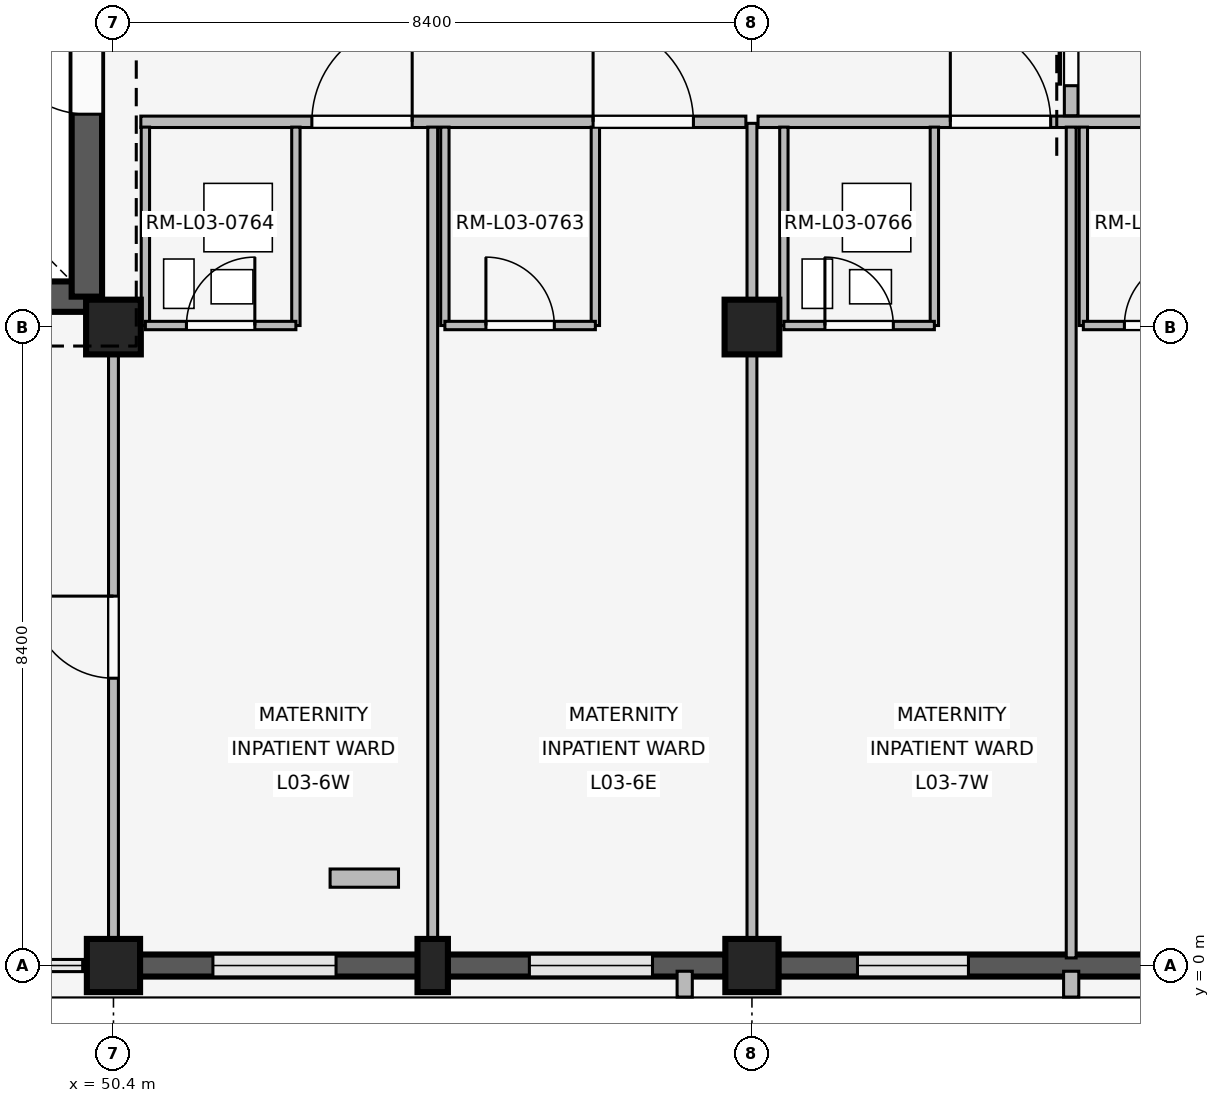
"""IFC4 building model, lengths in metres.
Left out: names, types, materials, properties, quantities, classifications, styles, units other than length and angle.
Written with IfcOpenShell. Run it as: python <this file> out.ifc"""

import sys

from ifc_helpers import new_model, si_unit, direction, frame, frame_2d, origin, origin_2d, place, context, subcontext, project, spatial, rectangle, extrude, element, fill, save


model = new_model("IFC4")
c1 = context("Model", 3, precision=1e-05, world=origin(), true_north=direction((0.0, 1.0)))
c2 = subcontext(c1, "Body", "Model", "MODEL_VIEW")
j1 = project(units=[si_unit("LENGTHUNIT", "METRE"), si_unit("PLANEANGLEUNIT", "RADIAN")], contexts=[c1])
p1 = place(None, origin())
s1 = spatial("IfcSite", under=j1, at=p1, CompositionType="ELEMENT")
p2 = place(p1, origin())
s2 = spatial("IfcBuilding", under=s1, at=p2, CompositionType="ELEMENT")
p3 = place(p2, frame((0.0, 0.0, 12.9)))
s3 = spatial("IfcBuildingStorey", under=s2, at=p3, CompositionType="ELEMENT", Elevation=12.9)
p4 = place(p3, frame((50.4, 0.0, 0.0), z_axis=(0.0, 0.0, 1.0), x_axis=(1.0, 0.0, 0.0)))
e1 = element("IfcColumn", 1, at=p4, inside=s3, PredefinedType="COLUMN", context=c2, shape_type="SweptSolid", body=[
    extrude(rectangle(XDim=0.7, YDim=0.7, at=origin_2d()), origin(), (0.0, 0.0, 1.0), 3.3),
])
p5 = place(p3, frame((50.4, 8.4, 0.0), z_axis=(0.0, 0.0, 1.0), x_axis=(1.0, 0.0, 0.0)))
e2 = element("IfcColumn", 2, at=p5, inside=s3, PredefinedType="COLUMN", context=c2, shape_type="SweptSolid", body=[
    extrude(rectangle(XDim=0.72, YDim=0.72, at=origin_2d()), origin(), (0.0, 0.0, 1.0), 3.3),
])
p6 = place(p3, frame((58.8, 0.0, 0.0), z_axis=(0.0, 0.0, 1.0), x_axis=(1.0, 0.0, 0.0)))
e3 = element("IfcColumn", 3, at=p6, inside=s3, PredefinedType="COLUMN", context=c2, shape_type="SweptSolid", body=[
    extrude(rectangle(XDim=0.7, YDim=0.7, at=origin_2d()), origin(), (0.0, 0.0, 1.0), 3.3),
])
p7 = place(p3, frame((58.8, 8.4, 0.0), z_axis=(0.0, 0.0, 1.0), x_axis=(1.0, 0.0, 0.0)))
e4 = element("IfcColumn", 4, at=p7, inside=s3, PredefinedType="COLUMN", context=c2, shape_type="SweptSolid", body=[
    extrude(rectangle(XDim=0.72, YDim=0.72, at=origin_2d()), origin(), (0.0, 0.0, 1.0), 3.3),
])
p8 = place(p3, frame((54.6, 0.0, 0.0), z_axis=(0.0, 0.0, 1.0), x_axis=(1.0, 0.0, 0.0)))
e5 = element("IfcColumn", 5, at=p8, inside=s3, PredefinedType="PILASTER", context=c2, shape_type="SweptSolid", body=[
    extrude(rectangle(XDim=0.4, YDim=0.7, at=origin_2d()), origin(), (0.0, 0.0, 1.0), 3.3),
])
p9 = place(p3, frame((58.455, 0.0, 0.0), z_axis=(0.0, 0.0, 1.0), x_axis=(-1.0, 0.0, 0.0)))
e6 = element("IfcWall", 6, at=p9, inside=s3, PredefinedType="SOLIDWALL", context=c2, shape_type="SweptSolid", body=[
    extrude(rectangle(XDim=7.71, YDim=0.29, at=frame_2d((3.855, 0.0))), origin(), (0.0, 0.0, 1.0), 2.44),
])
p10 = place(p9, frame((0.963, 0.0, 0.85)))
e7 = element("IfcOpeningElement", 7, at=p10, cuts=e6, PredefinedType="OPENING", context=c2, shape_type="SweptSolid", body=[
    extrude(rectangle(XDim=1.62, YDim=0.95, at=frame_2d((0.81, 0.475))), frame((0.0, 0.155, 0.0), z_axis=(0.0, -1.0, 0.0), x_axis=(1.0, 0.0, 0.0)), (0.0, 0.0, 1.0), 0.31),
])
p11 = place(p9, frame((5.127, 0.0, 0.85)))
e8 = element("IfcOpeningElement", 8, at=p11, cuts=e6, PredefinedType="OPENING", context=c2, shape_type="SweptSolid", body=[
    extrude(rectangle(XDim=1.62, YDim=0.95, at=frame_2d((0.81, 0.475))), frame((0.0, 0.155, 0.0), z_axis=(0.0, -1.0, 0.0), x_axis=(1.0, 0.0, 0.0)), (0.0, 0.0, 1.0), 0.31),
])
p12 = place(p3, frame((57.915, -0.075, 0.0), z_axis=(0.0, 0.0, 1.0), x_axis=(0.0, -1.0, 0.0)))
e9 = element("IfcWall", 9, at=p12, inside=s3, PredefinedType="ELEMENTEDWALL", context=c2, shape_type="SweptSolid", body=[
    extrude(rectangle(XDim=0.34, YDim=0.2, at=frame_2d((0.17, 0.0))), origin(), (0.0, 0.0, 1.0), 2.42),
])
p13 = place(p3, frame((66.855, 0.0, 0.0), z_axis=(0.0, 0.0, 1.0), x_axis=(-1.0, 0.0, 0.0)))
e10 = element("IfcWall", 10, at=p13, inside=s3, PredefinedType="SOLIDWALL", context=c2, shape_type="SweptSolid", body=[
    extrude(rectangle(XDim=7.71, YDim=0.29, at=frame_2d((3.855, 0.0))), origin(), (0.0, 0.0, 1.0), 2.44),
])
p14 = place(p13, frame((1.043, 0.0, 0.85)))
e11 = element("IfcOpeningElement", 11, at=p14, cuts=e10, PredefinedType="OPENING", context=c2, shape_type="SweptSolid", body=[
    extrude(rectangle(XDim=1.46, YDim=0.85, at=frame_2d((0.73, 0.425))), frame((0.0, 0.155, 0.0), z_axis=(0.0, -1.0, 0.0), x_axis=(1.0, 0.0, 0.0)), (0.0, 0.0, 1.0), 0.31),
])
p15 = place(p13, frame((5.207, 0.0, 0.85)))
e12 = element("IfcOpeningElement", 12, at=p15, cuts=e10, PredefinedType="OPENING", context=c2, shape_type="SweptSolid", body=[
    extrude(rectangle(XDim=1.46, YDim=0.85, at=frame_2d((0.73, 0.425))), frame((0.0, 0.155, 0.0), z_axis=(0.0, -1.0, 0.0), x_axis=(1.0, 0.0, 0.0)), (0.0, 0.0, 1.0), 0.31),
])
p16 = place(p3, frame((63.0, -0.075, 0.0), z_axis=(0.0, 0.0, 1.0), x_axis=(0.0, -1.0, 0.0)))
e13 = element("IfcWall", 13, at=p16, inside=s3, PredefinedType="ELEMENTEDWALL", context=c2, shape_type="SweptSolid", body=[
    extrude(rectangle(XDim=0.34, YDim=0.2, at=frame_2d((0.17, 0.0))), origin(), (0.0, 0.0, 1.0), 2.42),
])
p17 = place(p3, frame((42.55, 8.8, 0.0), z_axis=(0.0, 0.0, 1.0), x_axis=(1.0, 0.0, 0.0)))
e14 = element("IfcWall", 14, at=p17, inside=s3, PredefinedType="SHEAR", context=c2, shape_type="SweptSolid", body=[
    extrude(rectangle(XDim=7.5, YDim=0.4, at=frame_2d((3.75, 0.0))), origin(), (0.0, 0.0, 1.0), 3.02),
])
p18 = place(p17, frame((4.85, 0.0, 0.0)))
e15 = element("IfcOpeningElement", 15, at=p18, cuts=e14, PredefinedType="OPENING", context=c2, shape_type="SweptSolid", body=[
    extrude(rectangle(XDim=1.2, YDim=2.2, at=frame_2d((0.6, 1.1))), frame((0.0, 0.21, 0.0), z_axis=(0.0, -1.0, 0.0), x_axis=(1.0, 0.0, 0.0)), (0.0, 0.0, 1.0), 0.42),
])
p19 = place(p3, frame((50.05, 8.8, 0.0), z_axis=(0.0, 0.0, 1.0), x_axis=(0.0, 1.0, 0.0)))
e16 = element("IfcWall", 16, at=p19, inside=s3, PredefinedType="SHEAR", context=c2, shape_type="SweptSolid", body=[
    extrude(rectangle(XDim=7.55, YDim=0.4, at=frame_2d((3.775, 0.0))), origin(), (0.0, 0.0, 1.0), 3.02),
])
p20 = place(p19, frame((2.4, 0.0, 0.0)))
e17 = element("IfcOpeningElement", 17, at=p20, cuts=e16, PredefinedType="OPENING", context=c2, shape_type="SweptSolid", body=[
    extrude(rectangle(XDim=1.2, YDim=2.2, at=frame_2d((0.6, 1.1))), frame((0.0, 0.21, 0.0), z_axis=(0.0, -1.0, 0.0), x_axis=(1.0, 0.0, 0.0)), (0.0, 0.0, 1.0), 0.42),
])
p21 = place(p3, frame((50.4, 0.14, 0.0), z_axis=(0.0, 0.0, 1.0), x_axis=(0.0, 1.0, 0.0)))
e18 = element("IfcWall", 18, at=p21, inside=s3, PredefinedType="PARTITIONING", context=c2, shape_type="SweptSolid", body=[
    extrude(rectangle(XDim=8.21, YDim=0.13, at=frame_2d((4.105, 0.0))), origin(), (0.0, 0.0, 1.0), 2.42),
])
p22 = place(p21, frame((3.64, 0.0, 0.0)))
e19 = element("IfcOpeningElement", 19, at=p22, cuts=e18, PredefinedType="OPENING", context=c2, shape_type="SweptSolid", body=[
    extrude(rectangle(XDim=1.08, YDim=2.15, at=frame_2d((0.54, 1.075))), frame((0.0, 0.075, 0.0), z_axis=(0.0, -1.0, 0.0), x_axis=(1.0, 0.0, 0.0)), (0.0, 0.0, 1.0), 0.15),
])
p23 = place(p3, frame((50.76, 11.1, 0.0), z_axis=(0.0, 0.0, 1.0), x_axis=(1.0, 0.0, 0.0)))
e20 = element("IfcWall", 20, at=p23, inside=s3, PredefinedType="PARTITIONING", context=c2, shape_type="SweptSolid", body=[
    extrude(rectangle(XDim=7.96, YDim=0.15, at=frame_2d((3.98, 0.0))), origin(), (0.0, 0.0, 1.0), 2.42),
])
p24 = place(p23, frame((2.25, 0.0, 0.0)))
e21 = element("IfcOpeningElement", 21, at=p24, cuts=e20, PredefinedType="OPENING", context=c2, shape_type="SweptSolid", body=[
    extrude(rectangle(XDim=1.32, YDim=2.25, at=frame_2d((0.66, 1.125))), frame((0.0, 0.085, 0.0), z_axis=(0.0, -1.0, 0.0), x_axis=(1.0, 0.0, 0.0)), (0.0, 0.0, 1.0), 0.17),
])
p25 = place(p23, frame((5.95, 0.0, 0.0)))
e22 = element("IfcOpeningElement", 22, at=p25, cuts=e20, PredefinedType="OPENING", context=c2, shape_type="SweptSolid", body=[
    extrude(rectangle(XDim=1.32, YDim=2.25, at=frame_2d((0.66, 1.125))), frame((0.0, 0.085, 0.0), z_axis=(0.0, -1.0, 0.0), x_axis=(1.0, 0.0, 0.0)), (0.0, 0.0, 1.0), 0.17),
])
p26 = place(p3, frame((54.6, 0.1, 0.0), z_axis=(0.0, 0.0, 1.0), x_axis=(0.0, 1.0, 0.0)))
e23 = element("IfcWall", 23, at=p26, inside=s3, PredefinedType="PARTITIONING", context=c2, shape_type="SweptSolid", body=[
    extrude(rectangle(XDim=10.93, YDim=0.13, at=frame_2d((5.465, 0.0))), origin(), (0.0, 0.0, 1.0), 2.42),
])
for number, where, z_axis, x_axis in (
    (24, (50.82, 8.42, 0.0), (0.0, 0.0, 1.0), (0.0, 1.0, 0.0)),
    (25, (52.8, 8.42, 0.0), (0.0, 0.0, 1.0), (0.0, 1.0, 0.0)),
):
    element("IfcWall", number, at=place(p3, frame(where, z_axis=z_axis, x_axis=x_axis)), inside=s3, PredefinedType="PARTITIONING", context=c2, shape_type="SweptSolid", body=[
        extrude(rectangle(XDim=2.61, YDim=0.11, at=frame_2d((1.305, 0.0))), origin(), (0.0, 0.0, 1.0), 2.42),
    ])
p27 = place(p3, frame((50.82, 8.42, 0.0), z_axis=(0.0, 0.0, 1.0), x_axis=(1.0, 0.0, 0.0)))
e26 = element("IfcWall", 26, at=p27, inside=s3, PredefinedType="PARTITIONING", context=c2, shape_type="SweptSolid", body=[
    extrude(rectangle(XDim=1.98, YDim=0.11, at=frame_2d((0.99, 0.0))), origin(), (0.0, 0.0, 1.0), 2.42),
])
p28 = place(p27, frame((0.54, 0.0, 0.0)))
e27 = element("IfcOpeningElement", 27, at=p28, cuts=e26, PredefinedType="OPENING", context=c2, shape_type="SweptSolid", body=[
    extrude(rectangle(XDim=0.9, YDim=2.1, at=frame_2d((0.45, 1.05))), frame((0.0, 0.065, 0.0), z_axis=(0.0, -1.0, 0.0), x_axis=(1.0, 0.0, 0.0)), (0.0, 0.0, 1.0), 0.13),
])
for number, where, z_axis, x_axis in (
    (28, (54.76, 8.42, 0.0), (0.0, 0.0, 1.0), (0.0, 1.0, 0.0)),
    (29, (56.74, 8.42, 0.0), (0.0, 0.0, 1.0), (0.0, 1.0, 0.0)),
):
    element("IfcWall", number, at=place(p3, frame(where, z_axis=z_axis, x_axis=x_axis)), inside=s3, PredefinedType="PARTITIONING", context=c2, shape_type="SweptSolid", body=[
        extrude(rectangle(XDim=2.61, YDim=0.11, at=frame_2d((1.305, 0.0))), origin(), (0.0, 0.0, 1.0), 2.42),
    ])
p29 = place(p3, frame((54.76, 8.42, 0.0), z_axis=(0.0, 0.0, 1.0), x_axis=(1.0, 0.0, 0.0)))
e30 = element("IfcWall", 30, at=p29, inside=s3, PredefinedType="PARTITIONING", context=c2, shape_type="SweptSolid", body=[
    extrude(rectangle(XDim=1.98, YDim=0.11, at=frame_2d((0.99, 0.0))), origin(), (0.0, 0.0, 1.0), 2.42),
])
p30 = place(p29, frame((0.54, 0.0, 0.0)))
e31 = element("IfcOpeningElement", 31, at=p30, cuts=e30, PredefinedType="OPENING", context=c2, shape_type="SweptSolid", body=[
    extrude(rectangle(XDim=0.9, YDim=2.1, at=frame_2d((0.45, 1.05))), frame((0.0, 0.065, 0.0), z_axis=(0.0, -1.0, 0.0), x_axis=(1.0, 0.0, 0.0)), (0.0, 0.0, 1.0), 0.13),
])
p31 = place(p3, frame((53.25, 1.15, 0.0), z_axis=(0.0, 0.0, 1.0), x_axis=(1.0, 0.0, 0.0)))
e32 = element("IfcWall", 32, at=p31, inside=s3, PredefinedType="PLUMBINGWALL", context=c2, shape_type="SweptSolid", body=[
    extrude(rectangle(XDim=0.9, YDim=0.24, at=frame_2d((0.45, 0.0))), origin(), (0.0, 0.0, 1.0), 2.42),
])
p32 = place(p3, frame((58.8, 0.14, 0.0), z_axis=(0.0, 0.0, 1.0), x_axis=(0.0, 1.0, 0.0)))
e33 = element("IfcWall", 33, at=p32, inside=s3, PredefinedType="PARTITIONING", context=c2, shape_type="SweptSolid", body=[
    extrude(rectangle(XDim=10.94, YDim=0.13, at=frame_2d((5.47, 0.0))), origin(), (0.0, 0.0, 1.0), 2.42),
])
p33 = place(p3, frame((58.88, 11.1, 0.0), z_axis=(0.0, 0.0, 1.0), x_axis=(1.0, 0.0, 0.0)))
e34 = element("IfcWall", 34, at=p33, inside=s3, PredefinedType="PARTITIONING", context=c2, shape_type="SweptSolid", body=[
    extrude(rectangle(XDim=8.24, YDim=0.15, at=frame_2d((4.12, 0.0))), origin(), (0.0, 0.0, 1.0), 2.42),
])
p34 = place(p33, frame((2.53, 0.0, 0.0)))
e35 = element("IfcOpeningElement", 35, at=p34, cuts=e34, PredefinedType="OPENING", context=c2, shape_type="SweptSolid", body=[
    extrude(rectangle(XDim=1.32, YDim=2.25, at=frame_2d((0.66, 1.125))), frame((0.0, 0.085, 0.0), z_axis=(0.0, -1.0, 0.0), x_axis=(1.0, 0.0, 0.0)), (0.0, 0.0, 1.0), 0.17),
])
p35 = place(p33, frame((6.23, 0.0, 0.0)))
e36 = element("IfcOpeningElement", 36, at=p35, cuts=e34, PredefinedType="OPENING", context=c2, shape_type="SweptSolid", body=[
    extrude(rectangle(XDim=1.32, YDim=2.25, at=frame_2d((0.66, 1.125))), frame((0.0, 0.085, 0.0), z_axis=(0.0, -1.0, 0.0), x_axis=(1.0, 0.0, 0.0)), (0.0, 0.0, 1.0), 0.17),
])
p36 = place(p3, frame((63.0, 0.1, 0.0), z_axis=(0.0, 0.0, 1.0), x_axis=(0.0, 1.0, 0.0)))
e37 = element("IfcWall", 37, at=p36, inside=s3, PredefinedType="PARTITIONING", context=c2, shape_type="SweptSolid", body=[
    extrude(rectangle(XDim=10.93, YDim=0.13, at=frame_2d((5.465, 0.0))), origin(), (0.0, 0.0, 1.0), 2.42),
])
for number, where, z_axis, x_axis in (
    (38, (59.22, 8.42, 0.0), (0.0, 0.0, 1.0), (0.0, 1.0, 0.0)),
    (39, (61.2, 8.42, 0.0), (0.0, 0.0, 1.0), (0.0, 1.0, 0.0)),
):
    element("IfcWall", number, at=place(p3, frame(where, z_axis=z_axis, x_axis=x_axis)), inside=s3, PredefinedType="PARTITIONING", context=c2, shape_type="SweptSolid", body=[
        extrude(rectangle(XDim=2.61, YDim=0.11, at=frame_2d((1.305, 0.0))), origin(), (0.0, 0.0, 1.0), 2.42),
    ])
p37 = place(p3, frame((59.22, 8.42, 0.0), z_axis=(0.0, 0.0, 1.0), x_axis=(1.0, 0.0, 0.0)))
e40 = element("IfcWall", 40, at=p37, inside=s3, PredefinedType="PARTITIONING", context=c2, shape_type="SweptSolid", body=[
    extrude(rectangle(XDim=1.98, YDim=0.11, at=frame_2d((0.99, 0.0))), origin(), (0.0, 0.0, 1.0), 2.42),
])
p38 = place(p37, frame((0.54, 0.0, 0.0)))
e41 = element("IfcOpeningElement", 41, at=p38, cuts=e40, PredefinedType="OPENING", context=c2, shape_type="SweptSolid", body=[
    extrude(rectangle(XDim=0.9, YDim=2.1, at=frame_2d((0.45, 1.05))), frame((0.0, 0.065, 0.0), z_axis=(0.0, -1.0, 0.0), x_axis=(1.0, 0.0, 0.0)), (0.0, 0.0, 1.0), 0.13),
])
p39 = place(p3, frame((63.16, 8.42, 0.0), z_axis=(0.0, 0.0, 1.0), x_axis=(0.0, 1.0, 0.0)))
e42 = element("IfcWall", 42, at=p39, inside=s3, PredefinedType="PARTITIONING", context=c2, shape_type="SweptSolid", body=[
    extrude(rectangle(XDim=2.61, YDim=0.11, at=frame_2d((1.305, 0.0))), origin(), (0.0, 0.0, 1.0), 2.42),
])
p40 = place(p3, frame((63.16, 8.42, 0.0), z_axis=(0.0, 0.0, 1.0), x_axis=(1.0, 0.0, 0.0)))
e43 = element("IfcWall", 43, at=p40, inside=s3, PredefinedType="PARTITIONING", context=c2, shape_type="SweptSolid", body=[
    extrude(rectangle(XDim=1.98, YDim=0.11, at=frame_2d((0.99, 0.0))), origin(), (0.0, 0.0, 1.0), 2.42),
])
p41 = place(p40, frame((0.54, 0.0, 0.0)))
e44 = element("IfcOpeningElement", 44, at=p41, cuts=e43, PredefinedType="OPENING", context=c2, shape_type="SweptSolid", body=[
    extrude(rectangle(XDim=0.9, YDim=2.1, at=frame_2d((0.45, 1.05))), frame((0.0, 0.065, 0.0), z_axis=(0.0, -1.0, 0.0), x_axis=(1.0, 0.0, 0.0)), (0.0, 0.0, 1.0), 0.13),
])
p42 = place(p3, frame((63.0, 11.18, 0.0), z_axis=(0.0, 0.0, 1.0), x_axis=(0.0, 1.0, 0.0)))
e45 = element("IfcWall", 45, at=p42, inside=s3, PredefinedType="PARTITIONING", context=c2, shape_type="SweptSolid", body=[
    extrude(rectangle(XDim=2.84, YDim=0.18, at=frame_2d((1.42, 0.0))), origin(), (0.0, 0.0, 1.0), 2.42),
])
p43 = place(p42, frame((0.395, 0.0, 0.0)))
e46 = element("IfcOpeningElement", 46, at=p43, cuts=e45, PredefinedType="OPENING", context=c2, shape_type="SweptSolid", body=[
    extrude(rectangle(XDim=2.05, YDim=2.35, at=frame_2d((1.025, 1.175))), frame((0.0, 0.1, 0.0), z_axis=(0.0, -1.0, 0.0), x_axis=(1.0, 0.0, 0.0)), (0.0, 0.0, 1.0), 0.2),
])
p44 = place(p10, origin())
e47 = element("IfcWindow", 47, at=p44, inside=s3, PartitioningType="SINGLE_PANEL", PredefinedType="WINDOW", context=c2, shape_type="SweptSolid", body=[
    extrude(rectangle(XDim=1.62, YDim=0.95, at=frame_2d((0.81, 0.475))), frame((0.0, 0.03, 0.0), z_axis=(0.0, -1.0, 0.0), x_axis=(1.0, 0.0, 0.0)), (0.0, 0.0, 1.0), 0.06),
])
fill(e7, e47)
p45 = place(p11, origin())
e48 = element("IfcWindow", 48, at=p45, inside=s3, PartitioningType="SINGLE_PANEL", PredefinedType="WINDOW", context=c2, shape_type="SweptSolid", body=[
    extrude(rectangle(XDim=1.62, YDim=0.95, at=frame_2d((0.81, 0.475))), frame((0.0, 0.03, 0.0), z_axis=(0.0, -1.0, 0.0), x_axis=(1.0, 0.0, 0.0)), (0.0, 0.0, 1.0), 0.06),
])
fill(e8, e48)
p46 = place(p15, origin())
e49 = element("IfcWindow", 49, at=p46, inside=s3, PartitioningType="SINGLE_PANEL", PredefinedType="WINDOW", context=c2, shape_type="SweptSolid", body=[
    extrude(rectangle(XDim=1.46, YDim=0.85, at=frame_2d((0.73, 0.425))), frame((0.0, 0.03, 0.0), z_axis=(0.0, -1.0, 0.0), x_axis=(1.0, 0.0, 0.0)), (0.0, 0.0, 1.0), 0.06),
])
fill(e12, e49)
p47 = place(p20, origin())
e50 = element("IfcDoor", 50, at=p47, inside=s3, OperationType="SINGLE_SWING_RIGHT", PredefinedType="DOOR", context=c2, shape_type="SweptSolid", body=[
    extrude(rectangle(XDim=1.2, YDim=2.2, at=frame_2d((0.6, 1.1))), frame((0.0, 0.025, 0.0), z_axis=(0.0, -1.0, 0.0), x_axis=(1.0, 0.0, 0.0)), (0.0, 0.0, 1.0), 0.05),
])
fill(e17, e50)
p48 = place(p22, origin())
e51 = element("IfcDoor", 51, at=p48, inside=s3, OperationType="SINGLE_SWING_RIGHT", PredefinedType="DOOR", context=c2, shape_type="SweptSolid", body=[
    extrude(rectangle(XDim=1.08, YDim=2.15, at=frame_2d((0.54, 1.075))), frame((0.0, 0.025, 0.0), z_axis=(0.0, -1.0, 0.0), x_axis=(1.0, 0.0, 0.0)), (0.0, 0.0, 1.0), 0.05),
])
fill(e19, e51)
p49 = place(p24, origin())
e52 = element("IfcDoor", 52, at=p49, inside=s3, OperationType="SINGLE_SWING_RIGHT", PredefinedType="DOOR", context=c2, shape_type="SweptSolid", body=[
    extrude(rectangle(XDim=1.32, YDim=2.25, at=frame_2d((0.66, 1.125))), frame((0.0, 0.025, 0.0), z_axis=(0.0, -1.0, 0.0), x_axis=(1.0, 0.0, 0.0)), (0.0, 0.0, 1.0), 0.05),
])
fill(e21, e52)
p50 = place(p25, origin())
e53 = element("IfcDoor", 53, at=p50, inside=s3, OperationType="SINGLE_SWING_LEFT", PredefinedType="DOOR", context=c2, shape_type="SweptSolid", body=[
    extrude(rectangle(XDim=1.32, YDim=2.25, at=frame_2d((0.66, 1.125))), frame((0.0, 0.025, 0.0), z_axis=(0.0, -1.0, 0.0), x_axis=(1.0, 0.0, 0.0)), (0.0, 0.0, 1.0), 0.05),
])
fill(e22, e53)
p51 = place(p28, origin())
e54 = element("IfcDoor", 54, at=p51, inside=s3, OperationType="SINGLE_SWING_RIGHT", PredefinedType="DOOR", context=c2, shape_type="SweptSolid", body=[
    extrude(rectangle(XDim=0.9, YDim=2.1, at=frame_2d((0.45, 1.05))), frame((0.0, 0.025, 0.0), z_axis=(0.0, -1.0, 0.0), x_axis=(1.0, 0.0, 0.0)), (0.0, 0.0, 1.0), 0.05),
])
fill(e27, e54)
p52 = place(p30, origin())
e55 = element("IfcDoor", 55, at=p52, inside=s3, OperationType="SINGLE_SWING_LEFT", PredefinedType="DOOR", context=c2, shape_type="SweptSolid", body=[
    extrude(rectangle(XDim=0.9, YDim=2.1, at=frame_2d((0.45, 1.05))), frame((0.0, 0.025, 0.0), z_axis=(0.0, -1.0, 0.0), x_axis=(1.0, 0.0, 0.0)), (0.0, 0.0, 1.0), 0.05),
])
fill(e31, e55)
p53 = place(p34, origin())
e56 = element("IfcDoor", 56, at=p53, inside=s3, OperationType="SINGLE_SWING_LEFT", PredefinedType="DOOR", context=c2, shape_type="SweptSolid", body=[
    extrude(rectangle(XDim=1.32, YDim=2.25, at=frame_2d((0.66, 1.125))), frame((0.0, 0.025, 0.0), z_axis=(0.0, -1.0, 0.0), x_axis=(1.0, 0.0, 0.0)), (0.0, 0.0, 1.0), 0.05),
])
fill(e35, e56)
p54 = place(p38, origin())
e57 = element("IfcDoor", 57, at=p54, inside=s3, OperationType="SINGLE_SWING_LEFT", PredefinedType="DOOR", context=c2, shape_type="SweptSolid", body=[
    extrude(rectangle(XDim=0.9, YDim=2.1, at=frame_2d((0.45, 1.05))), frame((0.0, 0.025, 0.0), z_axis=(0.0, -1.0, 0.0), x_axis=(1.0, 0.0, 0.0)), (0.0, 0.0, 1.0), 0.05),
])
fill(e41, e57)
p55 = place(p41, origin())
e58 = element("IfcDoor", 58, at=p55, inside=s3, OperationType="SINGLE_SWING_RIGHT", PredefinedType="DOOR", context=c2, shape_type="SweptSolid", body=[
    extrude(rectangle(XDim=0.9, YDim=2.1, at=frame_2d((0.45, 1.05))), frame((0.0, 0.025, 0.0), z_axis=(0.0, -1.0, 0.0), x_axis=(1.0, 0.0, 0.0)), (0.0, 0.0, 1.0), 0.05),
])
fill(e44, e58)
p56 = place(p43, origin())
e59 = element("IfcDoor", 59, at=p56, inside=s3, OperationType="SLIDING_TO_LEFT", PredefinedType="DOOR", context=c2, shape_type="SweptSolid", body=[
    extrude(rectangle(XDim=2.05, YDim=2.35, at=frame_2d((1.025, 1.175))), frame((0.0, 0.025, 0.0), z_axis=(0.0, -1.0, 0.0), x_axis=(1.0, 0.0, 0.0)), (0.0, 0.0, 1.0), 0.05),
])
fill(e46, e59)
save(model, sys.argv[1])
